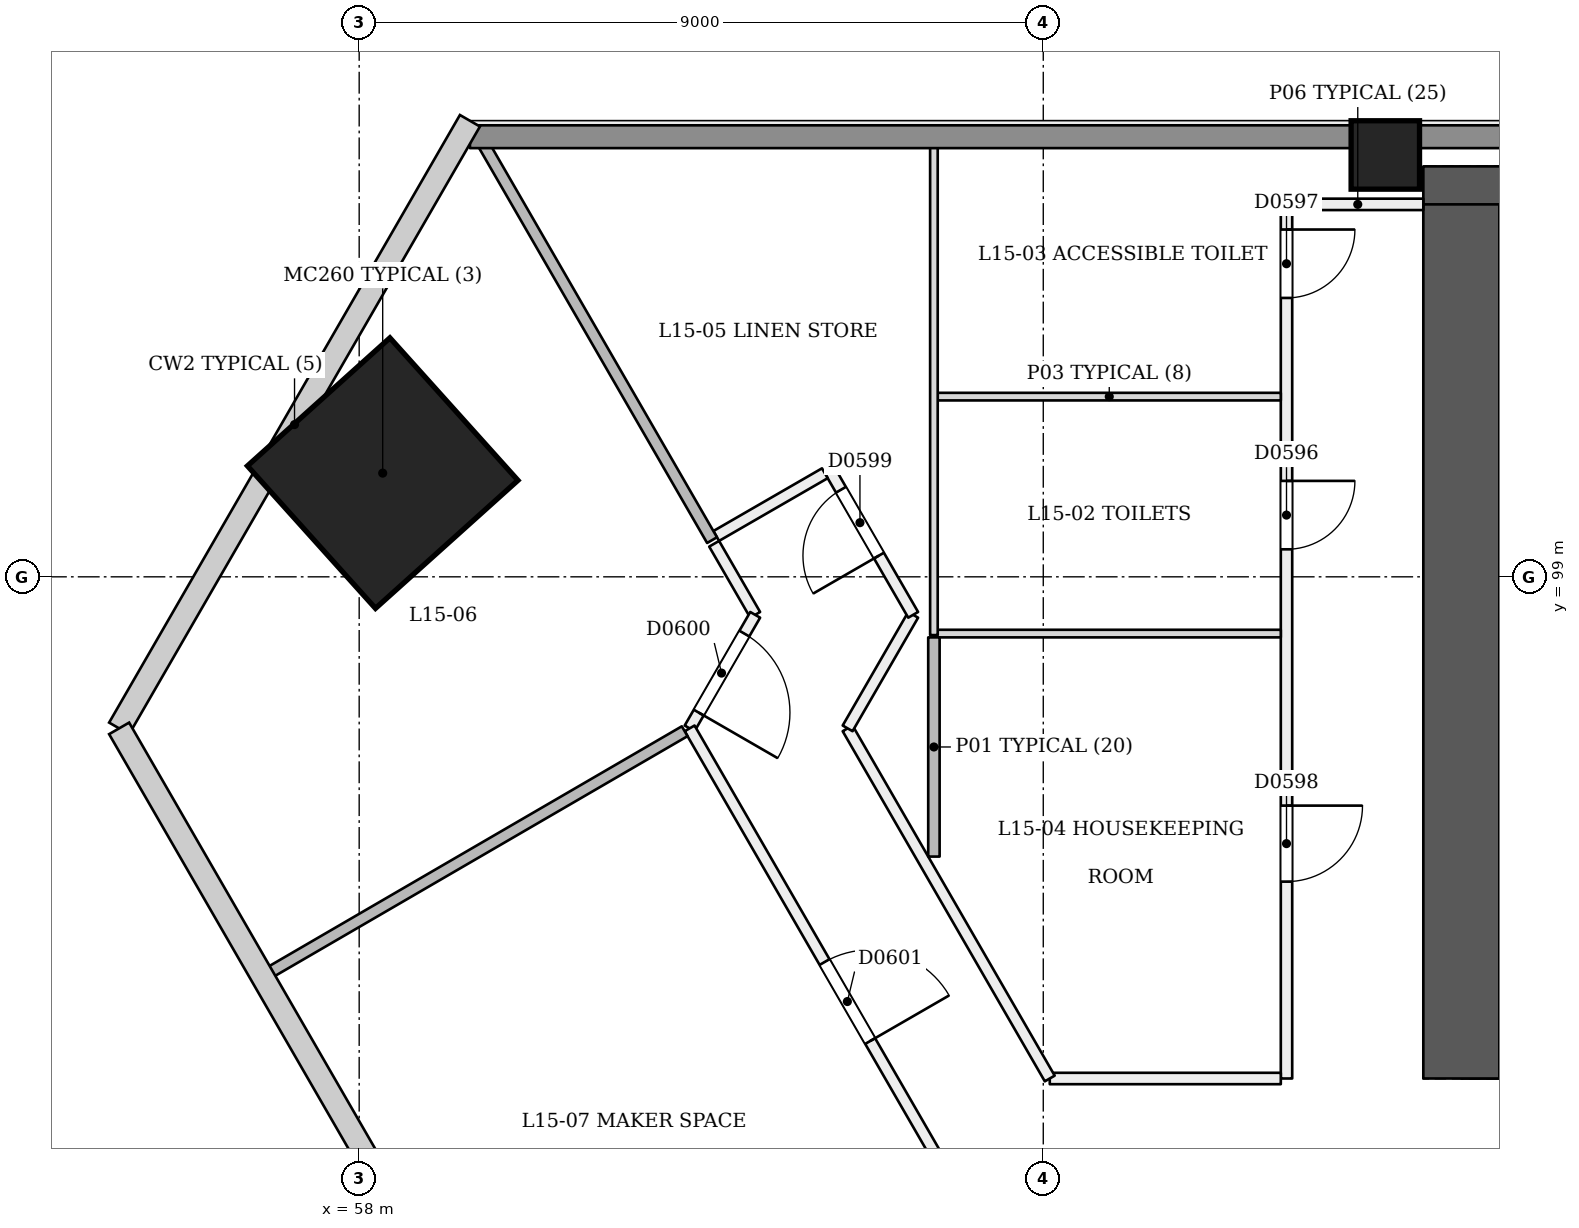
"""IFC4 building model, lengths in metres.
Left out: names, types, materials, properties, quantities, classifications, styles, units other than length and angle.
Written with IfcOpenShell. Run it as: python <this file> out.ifc"""

import sys

from ifc_helpers import new_model, si_unit, direction, frame, frame_2d, origin, origin_2d, place, context, subcontext, project, spatial, rectangle, extrude, element, fill, save


model = new_model("IFC4")
c1 = context("Model", 3, precision=1e-05, world=origin(), true_north=direction((0.0, 1.0)))
c2 = subcontext(c1, "Body", "Model", "MODEL_VIEW")
j1 = project(units=[si_unit("LENGTHUNIT", "METRE"), si_unit("PLANEANGLEUNIT", "RADIAN")], contexts=[c1])
p1 = place(None, origin())
s1 = spatial("IfcSite", under=j1, at=p1, CompositionType="ELEMENT")
p2 = place(p1, origin())
s2 = spatial("IfcBuilding", under=s1, at=p2, CompositionType="ELEMENT")
p3 = place(p2, frame((0.0, 0.0, 63.0)))
s3 = spatial("IfcBuildingStorey", under=s2, at=p3, CompositionType="ELEMENT", Elevation=63.0)
p4 = place(p3, frame((72.5, 92.9, 0.0), z_axis=(0.0, 0.0, 1.0), x_axis=(1.0, 0.0, 0.0)))
e1 = element("IfcWall", 1, at=p4, inside=s3, PredefinedType="SHEAR", context=c2, shape_type="SweptSolid", body=[
    extrude(rectangle(XDim=25.5, YDim=1.0, at=frame_2d((12.75, 0.0))), origin(), (0.0, 0.0, 1.0), 3.6),
])
p5 = place(p4, frame((1.3, 0.0, 0.0)))
e2 = element("IfcOpeningElement", 2, at=p5, cuts=e1, PredefinedType="OPENING", context=c2, shape_type="SweptSolid", body=[
    extrude(rectangle(XDim=1.2, YDim=2.1, at=frame_2d((0.6, 1.05))), frame((0.0, 0.51, 0.0), z_axis=(0.0, -1.0, 0.0), x_axis=(1.0, 0.0, 0.0)), (0.0, 0.0, 1.0), 1.021),
])
p6 = place(p4, frame((3.5, 0.0, 0.0)))
e3 = element("IfcOpeningElement", 3, at=p6, cuts=e1, PredefinedType="OPENING", context=c2, shape_type="SweptSolid", body=[
    extrude(rectangle(XDim=1.2, YDim=2.1, at=frame_2d((0.6, 1.05))), frame((0.0, 0.51, 0.0), z_axis=(0.0, -1.0, 0.0), x_axis=(1.0, 0.0, 0.0)), (0.0, 0.0, 1.0), 1.021),
])
p7 = place(p4, frame((13.5, 0.0, 0.0)))
e4 = element("IfcOpeningElement", 4, at=p7, cuts=e1, PredefinedType="OPENING", context=c2, shape_type="SweptSolid", body=[
    extrude(rectangle(XDim=1.2, YDim=2.1, at=frame_2d((0.6, 1.05))), frame((0.0, 0.51, 0.0), z_axis=(0.0, -1.0, 0.0), x_axis=(1.0, 0.0, 0.0)), (0.0, 0.0, 1.0), 1.021),
])
p8 = place(p4, frame((16.363, 0.0, 0.0)))
e5 = element("IfcOpeningElement", 5, at=p8, cuts=e1, PredefinedType="OPENING", context=c2, shape_type="SweptSolid", body=[
    extrude(rectangle(XDim=1.0, YDim=2.1, at=frame_2d((0.5, 1.05))), frame((0.0, 0.51, 0.0), z_axis=(0.0, -1.0, 0.0), x_axis=(1.0, 0.0, 0.0)), (0.0, 0.0, 1.0), 1.021),
])
p9 = place(p4, frame((19.8, 0.0, 0.0)))
e6 = element("IfcOpeningElement", 6, at=p9, cuts=e1, PredefinedType="OPENING", context=c2, shape_type="SweptSolid", body=[
    extrude(rectangle(XDim=1.0, YDim=2.1, at=frame_2d((0.5, 1.05))), frame((0.0, 0.51, 0.0), z_axis=(0.0, -1.0, 0.0), x_axis=(1.0, 0.0, 0.0)), (0.0, 0.0, 1.0), 1.021),
])
p10 = place(p4, frame((22.788, 0.0, 0.0)))
e7 = element("IfcOpeningElement", 7, at=p10, cuts=e1, PredefinedType="OPENING", context=c2, shape_type="SweptSolid", body=[
    extrude(rectangle(XDim=1.0, YDim=2.1, at=frame_2d((0.5, 1.05))), frame((0.0, 0.51, 0.0), z_axis=(0.0, -1.0, 0.0), x_axis=(1.0, 0.0, 0.0)), (0.0, 0.0, 1.0), 1.021),
])
p11 = place(p3, frame((97.5, 103.9, 0.0), z_axis=(0.0, 0.0, 1.0), x_axis=(-1.0, 0.0, 0.0)))
e8 = element("IfcWall", 8, at=p11, inside=s3, PredefinedType="SHEAR", context=c2, shape_type="SweptSolid", body=[
    extrude(rectangle(XDim=25.5, YDim=1.0, at=frame_2d((12.75, 0.0))), origin(), (0.0, 0.0, 1.0), 3.6),
])
p12 = place(p3, frame((72.5, 103.9, 0.0), z_axis=(0.0, 0.0, 1.0), x_axis=(0.0, -1.0, 0.0)))
e9 = element("IfcWall", 9, at=p12, inside=s3, PredefinedType="SHEAR", context=c2, shape_type="SweptSolid", body=[
    extrude(rectangle(XDim=11.5, YDim=1.0, at=frame_2d((5.75, 0.0))), origin(), (0.0, 0.0, 1.0), 3.6),
])
p13 = place(p3, frame((58.275, 100.353, 0.0), z_axis=(0.028334084323, 0.009218745139, 0.999555998633), x_axis=(-0.865474588782, 0.500556748558, 0.019916767958)))
e10 = element("IfcColumn", 10, at=p13, inside=s3, PredefinedType="COLUMN", context=c2, shape_type="SweptSolid", body=[
    extrude(rectangle(XDim=2.52, YDim=2.52, at=origin_2d()), origin(), (0.0, 0.0, 1.0), 3.602),
])
p14 = place(p3, frame((71.5, 104.55, 0.0), z_axis=(0.0, 0.0, 1.0), x_axis=(1.0, 0.0, 0.0)))
e11 = element("IfcColumn", 11, at=p14, inside=s3, PredefinedType="COLUMN", context=c2, shape_type="SweptSolid", body=[
    extrude(rectangle(XDim=0.9, YDim=0.9, at=origin_2d()), origin(), (0.0, 0.0, 1.0), 3.6),
])
p15 = place(p3, frame((72.0, 103.9, 0.0), z_axis=(0.0, 0.0, 1.0), x_axis=(-1.0, 0.0, 0.0)))
e12 = element("IfcWall", 12, at=p15, inside=s3, PredefinedType="PARTITIONING", context=c2, shape_type="SweptSolid", body=[
    extrude(rectangle(XDim=1.725, YDim=0.15, at=frame_2d((0.863, 0.0))), origin(), (0.0, 0.0, 1.0), 2.6),
])
p16 = place(p3, frame((70.2, 103.9, 0.0), z_axis=(0.0, 0.0, 1.0), x_axis=(0.0, -1.0, 0.0)))
e13 = element("IfcWall", 13, at=p16, inside=s3, PredefinedType="PARTITIONING", context=c2, shape_type="SweptSolid", body=[
    extrude(rectangle(XDim=11.5, YDim=0.15, at=frame_2d((5.75, 0.0))), origin(), (0.0, 0.0, 1.0), 2.6),
])
p17 = place(p16, frame((3.638, 0.0, 0.0)))
e14 = element("IfcOpeningElement", 14, at=p17, cuts=e13, PredefinedType="OPENING", context=c2, shape_type="SweptSolid", body=[
    extrude(rectangle(XDim=0.9, YDim=2.1, at=frame_2d((0.45, 1.05))), frame((0.0, 0.085, 0.0), z_axis=(0.0, -1.0, 0.0), x_axis=(1.0, 0.0, 0.0)), (0.0, 0.0, 1.0), 0.171),
])
p18 = place(p16, frame((0.331, 0.0, 0.0)))
e15 = element("IfcOpeningElement", 15, at=p18, cuts=e13, PredefinedType="OPENING", context=c2, shape_type="SweptSolid", body=[
    extrude(rectangle(XDim=0.9, YDim=2.1, at=frame_2d((0.45, 1.05))), frame((0.0, 0.085, 0.0), z_axis=(0.0, -1.0, 0.0), x_axis=(1.0, 0.0, 0.0)), (0.0, 0.0, 1.0), 0.171),
])
p19 = place(p16, frame((7.91, 0.0, 0.0)))
e16 = element("IfcOpeningElement", 16, at=p19, cuts=e13, PredefinedType="OPENING", context=c2, shape_type="SweptSolid", body=[
    extrude(rectangle(XDim=1.0, YDim=2.1, at=frame_2d((0.5, 1.05))), frame((0.0, 0.085, 0.0), z_axis=(0.0, -1.0, 0.0), x_axis=(1.0, 0.0, 0.0)), (0.0, 0.0, 1.0), 0.171),
])
p20 = place(p3, frame((70.125, 92.4, 0.0), z_axis=(0.0, 0.0, 1.0), x_axis=(-1.0, 0.0, 0.0)))
e17 = element("IfcWall", 17, at=p20, inside=s3, PredefinedType="PARTITIONING", context=c2, shape_type="SweptSolid", body=[
    extrude(rectangle(XDim=3.04, YDim=0.15, at=frame_2d((1.52, 0.0))), origin(), (0.0, 0.0, 1.0), 3.1),
])
p21 = place(p3, frame((67.085, 92.4, 0.0), z_axis=(0.0, 0.0, 1.0), x_axis=(-0.500019109324, 0.86601437073, 0.0)))
e18 = element("IfcWall", 18, at=p21, inside=s3, PredefinedType="PARTITIONING", context=c2, shape_type="SweptSolid", body=[
    extrude(rectangle(XDim=5.319, YDim=0.15, at=frame_2d((2.66, 0.0))), origin(), (0.0, 0.0, 1.0), 3.1),
])
p22 = place(p3, frame((64.426, 97.006, 0.0), z_axis=(0.0, 0.0, 1.0), x_axis=(0.500081852351, 0.86597814115, 0.0)))
e19 = element("IfcWall", 19, at=p22, inside=s3, PredefinedType="PARTITIONING", context=c2, shape_type="SweptSolid", body=[
    extrude(rectangle(XDim=1.725, YDim=0.15, at=frame_2d((0.862, 0.0))), origin(), (0.0, 0.0, 1.0), 3.1),
])
p23 = place(p3, frame((65.288, 98.5, 0.0), z_axis=(0.0, 0.0, 1.0), x_axis=(-0.500005024956, 0.866022502605, 0.0)))
e20 = element("IfcWall", 20, at=p23, inside=s3, PredefinedType="PARTITIONING", context=c2, shape_type="SweptSolid", body=[
    extrude(rectangle(XDim=2.194, YDim=0.15, at=frame_2d((1.097, 0.0))), origin(), (0.0, 0.0, 1.0), 3.1),
])
p24 = place(p23, frame((0.9, 0.0, 0.0)))
e21 = element("IfcOpeningElement", 21, at=p24, cuts=e20, PredefinedType="OPENING", context=c2, shape_type="SweptSolid", body=[
    extrude(rectangle(XDim=1.0, YDim=2.1, at=frame_2d((0.5, 1.05))), frame((0.0, 0.085, 0.0), z_axis=(0.0, -1.0, 0.0), x_axis=(1.0, 0.0, 0.0)), (0.0, 0.0, 1.0), 0.171),
])
p25 = place(p3, frame((64.126, 100.363, 0.0), z_axis=(0.0, 0.0, 1.0), x_axis=(-0.866040211805, -0.499974350878, 0.0)))
e22 = element("IfcWall", 22, at=p25, inside=s3, PredefinedType="PARTITIONING", context=c2, shape_type="SweptSolid", body=[
    extrude(rectangle(XDim=1.65, YDim=0.15, at=frame_2d((0.825, 0.0))), origin(), (0.0, 0.0, 1.0), 3.1),
])
p26 = place(p3, frame((62.67, 99.435, 0.0), z_axis=(0.0, 0.0, 1.0), x_axis=(0.499957341738, -0.866050031143, 0.0)))
e23 = element("IfcWall", 23, at=p26, inside=s3, PredefinedType="PARTITIONING", context=c2, shape_type="SweptSolid", body=[
    extrude(rectangle(XDim=1.08, YDim=0.15, at=frame_2d((0.54, 0.0))), origin(), (0.0, 0.0, 1.0), 3.1),
])
p27 = place(p3, frame((63.21, 98.5, 0.0), z_axis=(0.0, 0.0, 1.0), x_axis=(-0.499975693202, -0.866039436866, 0.0)))
e24 = element("IfcWall", 24, at=p27, inside=s3, PredefinedType="PARTITIONING", context=c2, shape_type="SweptSolid", body=[
    extrude(rectangle(XDim=1.725, YDim=0.15, at=frame_2d((0.862, 0.0))), origin(), (0.0, 0.0, 1.0), 3.1),
])
p28 = place(p27, frame((0.285, 0.0, 0.0)))
e25 = element("IfcOpeningElement", 25, at=p28, cuts=e24, PredefinedType="OPENING", context=c2, shape_type="SweptSolid", body=[
    extrude(rectangle(XDim=1.2, YDim=2.1, at=frame_2d((0.6, 1.05))), frame((0.0, 0.085, 0.0), z_axis=(0.0, -1.0, 0.0), x_axis=(1.0, 0.0, 0.0)), (0.0, 0.0, 1.0), 0.171),
])
p29 = place(p3, frame((62.347, 97.006, 0.0), z_axis=(0.0, 0.0, 1.0), x_axis=(0.500001772576, -0.866024380385, 0.0)))
e26 = element("IfcWall", 26, at=p29, inside=s3, PredefinedType="PARTITIONING", context=c2, shape_type="SweptSolid", body=[
    extrude(rectangle(XDim=43.58, YDim=0.15, at=frame_2d((21.79, 0.0))), origin(), (0.0, 0.0, 1.0), 2.7),
])
p30 = place(p29, frame((3.55, 0.0, 0.0)))
e27 = element("IfcOpeningElement", 27, at=p30, cuts=e26, PredefinedType="OPENING", context=c2, shape_type="SweptSolid", body=[
    extrude(rectangle(XDim=1.2, YDim=2.1, at=frame_2d((0.6, 1.05))), frame((0.0, 0.085, 0.0), z_axis=(0.0, -1.0, 0.0), x_axis=(1.0, 0.0, 0.0)), (0.0, 0.0, 1.0), 0.171),
])
p31 = place(p29, frame((12.19, 0.0, 0.0)))
e28 = element("IfcOpeningElement", 28, at=p31, cuts=e26, PredefinedType="OPENING", context=c2, shape_type="SweptSolid", body=[
    extrude(rectangle(XDim=1.2, YDim=2.1, at=frame_2d((0.6, 1.05))), frame((0.0, 0.085, 0.0), z_axis=(0.0, -1.0, 0.0), x_axis=(1.0, 0.0, 0.0)), (0.0, 0.0, 1.0), 0.171),
])
p32 = place(p29, frame((19.04, 0.0, 0.0)))
e29 = element("IfcOpeningElement", 29, at=p32, cuts=e26, PredefinedType="OPENING", context=c2, shape_type="SweptSolid", body=[
    extrude(rectangle(XDim=1.0, YDim=2.1, at=frame_2d((0.5, 1.05))), frame((0.0, 0.085, 0.0), z_axis=(0.0, -1.0, 0.0), x_axis=(1.0, 0.0, 0.0)), (0.0, 0.0, 1.0), 0.171),
])
p33 = place(p29, frame((27.94, 0.0, 0.0)))
e30 = element("IfcOpeningElement", 30, at=p33, cuts=e26, PredefinedType="OPENING", context=c2, shape_type="SweptSolid", body=[
    extrude(rectangle(XDim=1.2, YDim=2.1, at=frame_2d((0.6, 1.05))), frame((0.0, 0.085, 0.0), z_axis=(0.0, -1.0, 0.0), x_axis=(1.0, 0.0, 0.0)), (0.0, 0.0, 1.0), 0.171),
])
p34 = place(p29, frame((38.831, 0.0, 0.0)))
e31 = element("IfcOpeningElement", 31, at=p34, cuts=e26, PredefinedType="OPENING", context=c2, shape_type="SweptSolid", body=[
    extrude(rectangle(XDim=1.2, YDim=2.1, at=frame_2d((0.6, 1.05))), frame((0.0, 0.085, 0.0), z_axis=(0.0, -1.0, 0.0), x_axis=(1.0, 0.0, 0.0)), (0.0, 0.0, 1.0), 0.171),
])
p35 = place(p3, frame((70.125, 101.371, 0.0), z_axis=(0.0, 0.0, 1.0), x_axis=(-1.0, 0.0, 0.0)))
e32 = element("IfcWall", 32, at=p35, inside=s3, PredefinedType="PARTITIONING", context=c2, shape_type="SweptSolid", body=[
    extrude(rectangle(XDim=4.514, YDim=0.1, at=frame_2d((2.257, 0.0))), origin(), (0.0, 0.0, 1.0), 3.1),
])
p36 = place(p3, frame((65.561, 98.253, 0.0), z_axis=(0.0, 0.0, 1.0), x_axis=(1.0, 0.0, 0.0)))
e33 = element("IfcWall", 33, at=p36, inside=s3, PredefinedType="PARTITIONING", context=c2, shape_type="SweptSolid", body=[
    extrude(rectangle(XDim=4.564, YDim=0.1, at=frame_2d((2.282, 0.0))), origin(), (0.0, 0.0, 1.0), 3.1),
])
p37 = place(p3, frame((65.561, 104.9, 0.0), z_axis=(0.0, 0.0, 1.0), x_axis=(0.0, -1.0, 0.0)))
e34 = element("IfcWall", 34, at=p37, inside=s3, PredefinedType="PARTITIONING", context=c2, shape_type="SweptSolid", body=[
    extrude(rectangle(XDim=6.667, YDim=0.1, at=frame_2d((3.333, 0.0))), origin(), (0.0, 0.0, 1.0), 2.6),
])
p38 = place(p3, frame((65.561, 98.203, 0.0), z_axis=(0.0, 0.0, 1.0), x_axis=(0.0, -1.0, 0.0)))
e35 = element("IfcWall", 35, at=p38, inside=s3, PredefinedType="PARTITIONING", context=c2, shape_type="SweptSolid", body=[
    extrude(rectangle(XDim=2.884, YDim=0.15, at=frame_2d((1.442, 0.0))), origin(), (0.0, 0.0, 1.0), 3.1),
])
p39 = place(p3, frame((59.515, 104.9, 0.0), z_axis=(0.0, 0.0, 1.0), x_axis=(0.500005118993, -0.866022448312, 0.0)))
e36 = element("IfcWall", 36, at=p39, inside=s3, PredefinedType="PARTITIONING", context=c2, shape_type="SweptSolid", body=[
    extrude(rectangle(XDim=6.255, YDim=0.15, at=frame_2d((3.128, 0.0))), origin(), (0.0, 0.0, 1.0), 2.6),
])
p40 = place(p3, frame((56.814, 93.79, 0.0), z_axis=(0.0, 0.0, 1.0), x_axis=(0.864585576107, 0.502485603364, 0.0)))
e37 = element("IfcWall", 37, at=p40, inside=s3, PredefinedType="PARTITIONING", context=c2, shape_type="SweptSolid", body=[
    extrude(rectangle(XDim=6.325, YDim=0.15, at=frame_2d((3.163, 0.0))), origin(), (0.0, 0.0, 1.0), 2.6),
])
p41 = place(p3, frame((59.457, 104.79, 0.0), z_axis=(0.0, 0.0, 1.0), x_axis=(1.0, 0.0, 0.0)))
e38 = element("IfcWall", 38, at=p41, inside=s3, PredefinedType="SOLIDWALL", context=c2, shape_type="SweptSolid", body=[
    extrude(rectangle(XDim=51.086, YDim=0.3, at=frame_2d((25.543, 0.0))), origin(), (0.0, 0.0, 1.0), 2.6),
])
p42 = place(p17, origin())
e39 = element("IfcDoor", 39, at=p42, inside=s3, OperationType="SINGLE_SWING_LEFT", PredefinedType="NOTDEFINED", context=c2, shape_type="SweptSolid", body=[
    extrude(rectangle(XDim=0.9, YDim=2.1, at=frame_2d((0.45, 1.05))), frame((0.0, 0.025, 0.0), z_axis=(0.0, -1.0, 0.0), x_axis=(1.0, 0.0, 0.0)), (0.0, 0.0, 1.0), 0.05),
])
fill(e14, e39)
p43 = place(p18, origin())
e40 = element("IfcDoor", 40, at=p43, inside=s3, OperationType="SINGLE_SWING_LEFT", PredefinedType="NOTDEFINED", context=c2, shape_type="SweptSolid", body=[
    extrude(rectangle(XDim=0.9, YDim=2.1, at=frame_2d((0.45, 1.05))), frame((0.0, 0.025, 0.0), z_axis=(0.0, -1.0, 0.0), x_axis=(1.0, 0.0, 0.0)), (0.0, 0.0, 1.0), 0.05),
])
fill(e15, e40)
p44 = place(p19, origin())
e41 = element("IfcDoor", 41, at=p44, inside=s3, OperationType="SINGLE_SWING_LEFT", PredefinedType="NOTDEFINED", context=c2, shape_type="SweptSolid", body=[
    extrude(rectangle(XDim=1.0, YDim=2.1, at=frame_2d((0.5, 1.05))), frame((0.0, 0.025, 0.0), z_axis=(0.0, -1.0, 0.0), x_axis=(1.0, 0.0, 0.0)), (0.0, 0.0, 1.0), 0.05),
])
fill(e16, e41)
p45 = place(p24, origin())
e42 = element("IfcDoor", 42, at=p45, inside=s3, OperationType="SINGLE_SWING_LEFT", PredefinedType="NOTDEFINED", context=c2, shape_type="SweptSolid", body=[
    extrude(rectangle(XDim=1.0, YDim=2.1, at=frame_2d((0.5, 1.05))), frame((0.0, 0.025, 0.0), z_axis=(0.0, -1.0, 0.0), x_axis=(1.0, 0.0, 0.0)), (0.0, 0.0, 1.0), 0.05),
])
fill(e21, e42)
p46 = place(p28, origin())
e43 = element("IfcDoor", 43, at=p46, inside=s3, OperationType="SINGLE_SWING_RIGHT", PredefinedType="NOTDEFINED", context=c2, shape_type="SweptSolid", body=[
    extrude(rectangle(XDim=1.2, YDim=2.1, at=frame_2d((0.6, 1.05))), frame((0.0, 0.025, 0.0), z_axis=(0.0, -1.0, 0.0), x_axis=(1.0, 0.0, 0.0)), (0.0, 0.0, 1.0), 0.05),
])
fill(e25, e43)
p47 = place(p30, origin())
e44 = element("IfcDoor", 44, at=p47, inside=s3, OperationType="SINGLE_SWING_RIGHT", PredefinedType="NOTDEFINED", context=c2, shape_type="SweptSolid", body=[
    extrude(rectangle(XDim=1.2, YDim=2.1, at=frame_2d((0.6, 1.05))), frame((0.0, 0.025, 0.0), z_axis=(0.0, -1.0, 0.0), x_axis=(1.0, 0.0, 0.0)), (0.0, 0.0, 1.0), 0.05),
])
fill(e27, e44)
save(model, sys.argv[1])
